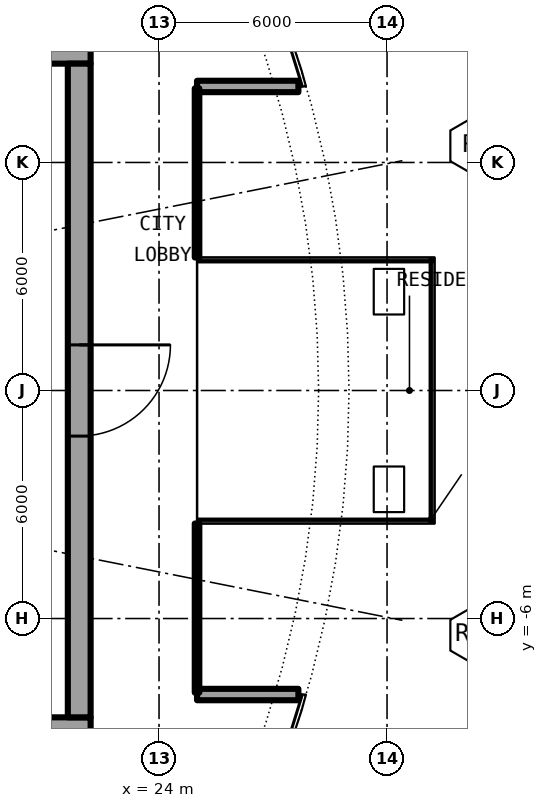
"""IFC4 building model, lengths in metres.
Left out: names, types, materials, properties, quantities, classifications, styles, units other than length and angle.
Written with IfcOpenShell. Run it as: python <this file> out.ifc"""

import sys

from ifc_helpers import new_model, si_unit, direction, frame, frame_2d, origin, place, context, subcontext, project, spatial, rectangle, extrude, element, fill, save


model = new_model("IFC4")
c1 = context("Model", 3, precision=1e-05, world=origin(), true_north=direction((0.0, 1.0)))
c2 = subcontext(c1, "Body", "Model", "MODEL_VIEW")
j1 = project(units=[si_unit("LENGTHUNIT", "METRE"), si_unit("PLANEANGLEUNIT", "RADIAN")], contexts=[c1])
p1 = place(None, origin())
s1 = spatial("IfcSite", under=j1, at=p1, CompositionType="ELEMENT")
p2 = place(p1, origin())
s2 = spatial("IfcBuilding", under=s1, at=p2, CompositionType="ELEMENT")
p3 = place(p2, frame((0.0, 0.0, 139.1)))
s3 = spatial("IfcBuildingStorey", under=s2, at=p3, CompositionType="ELEMENT", Elevation=139.1)
for number, where, z_axis, x_axis in (
    (1, (25.0, 8.0, 0.0), (0.0, 0.0, 1.0), (1.0, 0.0, 0.0)),
    (2, (25.0, -8.0, 0.0), (0.0, 0.0, 1.0), (1.0, 0.0, 0.0)),
):
    element("IfcWall", number, at=place(p3, frame(where, z_axis=z_axis, x_axis=x_axis)), inside=s3, PredefinedType="SOLIDWALL", context=c2, shape_type="SweptSolid", body=[
        extrude(rectangle(XDim=2.667, YDim=0.3, at=frame_2d((1.333, 0.0))), origin(), (0.0, 0.0, 1.0), 5.75),
    ])
p4 = place(p3, frame((22.2, 8.9, 0.0), z_axis=(0.0, 0.0, 1.0), x_axis=(-1.0, 0.0, 0.0)))
e3 = element("IfcWall", 3, at=p4, inside=s3, PredefinedType="SHEAR", context=c2, shape_type="SweptSolid", body=[
    extrude(rectangle(XDim=13.8, YDim=0.6, at=frame_2d((6.9, 0.0))), origin(), (0.0, 0.0, 1.0), 6.1),
])
p5 = place(p4, frame((1.125, 0.0, 0.0)))
e4 = element("IfcOpeningElement", 4, at=p5, cuts=e3, PredefinedType="OPENING", context=c2, shape_type="SweptSolid", body=[
    extrude(rectangle(XDim=1.2, YDim=2.3, at=frame_2d((0.6, 1.15))), frame((0.0, 0.31, 0.0), z_axis=(0.0, -1.0, 0.0), x_axis=(1.0, 0.0, 0.0)), (0.0, 0.0, 1.0), 0.62),
])
p6 = place(p3, frame((8.4, -8.9, 0.0), z_axis=(0.0, 0.0, 1.0), x_axis=(1.0, 0.0, 0.0)))
e5 = element("IfcWall", 5, at=p6, inside=s3, PredefinedType="SHEAR", context=c2, shape_type="SweptSolid", body=[
    extrude(rectangle(XDim=13.8, YDim=0.6, at=frame_2d((6.9, 0.0))), origin(), (0.0, 0.0, 1.0), 6.1),
])
p7 = place(p6, frame((11.475, 0.0, 0.0)))
e6 = element("IfcOpeningElement", 6, at=p7, cuts=e5, PredefinedType="OPENING", context=c2, shape_type="SweptSolid", body=[
    extrude(rectangle(XDim=1.2, YDim=2.3, at=frame_2d((0.6, 1.15))), frame((0.0, 0.31, 0.0), z_axis=(0.0, -1.0, 0.0), x_axis=(1.0, 0.0, 0.0)), (0.0, 0.0, 1.0), 0.62),
])
p8 = place(p3, frame((21.9, 8.6, 0.0), z_axis=(0.0, 0.0, 1.0), x_axis=(0.0, -1.0, 0.0)))
e7 = element("IfcWall", 7, at=p8, inside=s3, PredefinedType="SHEAR", context=c2, shape_type="SweptSolid", body=[
    extrude(rectangle(XDim=17.2, YDim=0.6, at=frame_2d((8.6, 0.0))), origin(), (0.0, 0.0, 1.0), 6.1),
])
p9 = place(p8, frame((7.4, 0.0, 0.0)))
e8 = element("IfcOpeningElement", 8, at=p9, cuts=e7, PredefinedType="OPENING", context=c2, shape_type="SweptSolid", body=[
    extrude(rectangle(XDim=2.4, YDim=2.3, at=frame_2d((1.2, 1.15))), frame((0.0, 0.31, 0.0), z_axis=(0.0, -1.0, 0.0), x_axis=(1.0, 0.0, 0.0)), (0.0, 0.0, 1.0), 0.62),
])
p10 = place(p3, frame((25.0, -3.5, 0.0), z_axis=(0.0, 0.0, 1.0), x_axis=(0.0, -1.0, 0.0)))
e9 = element("IfcWall", 9, at=p10, inside=s3, PredefinedType="PARTITIONING", context=c2, shape_type="SweptSolid", body=[
    extrude(rectangle(XDim=4.45, YDim=0.12, at=frame_2d((2.225, 0.0))), origin(), (0.0, 0.0, 1.0), 5.75),
])
p11 = place(p10, frame((0.4, 0.0, 0.1)))
e10 = element("IfcOpeningElement", 10, at=p11, cuts=e9, PredefinedType="OPENING", context=c2, shape_type="SweptSolid", body=[
    extrude(rectangle(XDim=3.6, YDim=5.4, at=frame_2d((1.8, 2.7))), frame((0.0, 0.07, 0.0), z_axis=(0.0, -1.0, 0.0), x_axis=(1.0, 0.0, 0.0)), (0.0, 0.0, 1.0), 0.14),
])
p12 = place(p3, frame((25.0, 3.5, 0.0), z_axis=(0.0, 0.0, 1.0), x_axis=(0.0, 1.0, 0.0)))
e11 = element("IfcWall", 11, at=p12, inside=s3, PredefinedType="PARTITIONING", context=c2, shape_type="SweptSolid", body=[
    extrude(rectangle(XDim=4.45, YDim=0.12, at=frame_2d((2.225, 0.0))), origin(), (0.0, 0.0, 1.0), 5.75),
])
p13 = place(p12, frame((0.4, 0.0, 0.1)))
e12 = element("IfcOpeningElement", 12, at=p13, cuts=e11, PredefinedType="OPENING", context=c2, shape_type="SweptSolid", body=[
    extrude(rectangle(XDim=3.6, YDim=5.4, at=frame_2d((1.8, 2.7))), frame((0.0, 0.07, 0.0), z_axis=(0.0, -1.0, 0.0), x_axis=(1.0, 0.0, 0.0)), (0.0, 0.0, 1.0), 0.14),
])
p14 = place(p9, origin())
e13 = element("IfcDoor", 13, at=p14, inside=s3, OperationType="SINGLE_SWING_LEFT", PredefinedType="DOOR", context=c2, shape_type="SweptSolid", body=[
    extrude(rectangle(XDim=2.4, YDim=2.3, at=frame_2d((1.2, 1.15))), frame((0.0, 0.025, 0.0), z_axis=(0.0, -1.0, 0.0), x_axis=(1.0, 0.0, 0.0)), (0.0, 0.0, 1.0), 0.05),
])
fill(e8, e13)
p15 = place(p11, origin())
e14 = element("IfcWindow", 14, at=p15, inside=s3, PartitioningType="SINGLE_PANEL", PredefinedType="WINDOW", context=c2, shape_type="SweptSolid", body=[
    extrude(rectangle(XDim=3.6, YDim=5.4, at=frame_2d((1.8, 2.7))), frame((0.0, 0.03, 0.0), z_axis=(0.0, -1.0, 0.0), x_axis=(1.0, 0.0, 0.0)), (0.0, 0.0, 1.0), 0.06),
])
fill(e10, e14)
p16 = place(p13, origin())
e15 = element("IfcWindow", 15, at=p16, inside=s3, PartitioningType="SINGLE_PANEL", PredefinedType="WINDOW", context=c2, shape_type="SweptSolid", body=[
    extrude(rectangle(XDim=3.6, YDim=5.4, at=frame_2d((1.8, 2.7))), frame((0.0, 0.03, 0.0), z_axis=(0.0, -1.0, 0.0), x_axis=(1.0, 0.0, 0.0)), (0.0, 0.0, 1.0), 0.06),
])
fill(e12, e15)
save(model, sys.argv[1])
